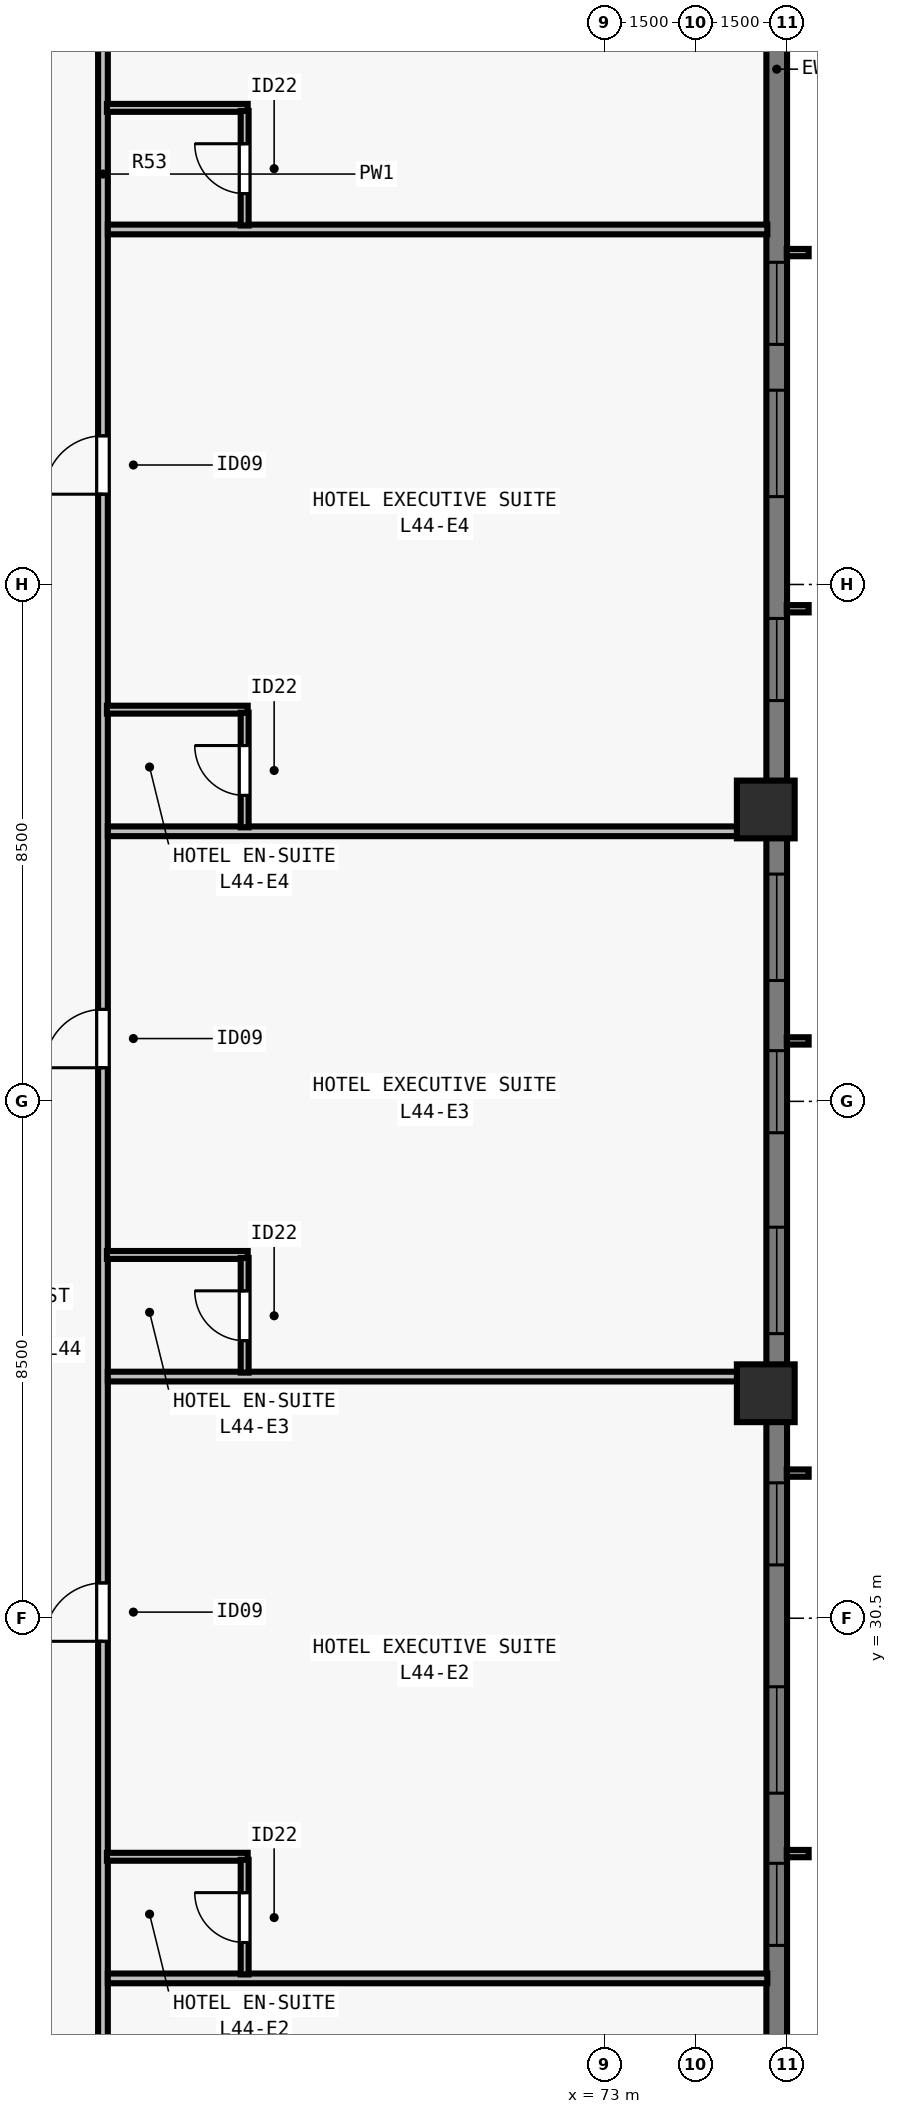
"""IFC4 building model, lengths in metres.
Left out: names, types, materials, properties, quantities, classifications, styles, units other than length and angle.
Written with IfcOpenShell. Run it as: python <this file> out.ifc"""

import sys

from ifc_helpers import new_model, si_unit, direction, frame, frame_2d, origin, origin_2d, place, context, subcontext, project, spatial, rectangle, extrude, element, fill, save


model = new_model("IFC4")
c1 = context("Model", 3, precision=1e-05, world=origin(), true_north=direction((0.0, 1.0)))
c2 = subcontext(c1, "Body", "Model", "MODEL_VIEW")
j1 = project(units=[si_unit("LENGTHUNIT", "METRE"), si_unit("PLANEANGLEUNIT", "RADIAN")], contexts=[c1])
p1 = place(None, origin())
s1 = spatial("IfcSite", under=j1, at=p1, CompositionType="ELEMENT")
p2 = place(p1, origin())
s2 = spatial("IfcBuilding", under=s1, at=p2, CompositionType="ELEMENT")
p3 = place(p2, frame((0.0, 0.0, 162.0)))
s3 = spatial("IfcBuildingStorey", under=s2, at=p3, CompositionType="ELEMENT", Elevation=162.0)
for number, where, z_axis, x_axis in (
    (1, (75.65, 34.2, 0.0), (0.0, 0.0, 1.0), (0.0, 1.0, 0.0)),
    (2, (75.65, 43.8, 0.0), (0.0, 0.0, 1.0), (0.0, 1.0, 0.0)),
):
    element("IfcColumn", number, at=place(p3, frame(where, z_axis=z_axis, x_axis=x_axis)), inside=s3, PredefinedType="COLUMN", context=c2, shape_type="SweptSolid", body=[
        extrude(rectangle(XDim=0.95, YDim=0.95, at=origin_2d()), origin(), (0.0, 0.0, 1.0), 3.5),
    ])
p4 = place(p3, frame((75.83, 59.0, 0.0), z_axis=(0.0, 0.0, 1.0), x_axis=(0.0, -1.0, 0.0)))
e3 = element("IfcWall", 3, at=p4, inside=s3, PredefinedType="SOLIDWALL", context=c2, shape_type="SweptSolid", body=[
    extrude(rectangle(XDim=39.682, YDim=0.34, at=frame_2d((19.841, 0.0))), origin(), (0.0, 0.0, 1.0), 3.28),
])
p5 = place(p4, frame((6.202, 0.0, 0.8)))
e4 = element("IfcOpeningElement", 4, at=p5, cuts=e3, PredefinedType="OPENING", context=c2, shape_type="SweptSolid", body=[
    extrude(rectangle(XDim=1.35, YDim=1.66, at=frame_2d((0.675, 0.83))), frame((0.0, 0.18, 0.0), z_axis=(0.0, -1.0, 0.0), x_axis=(1.0, 0.0, 0.0)), (0.0, 0.0, 1.0), 0.36),
])
p6 = place(p4, frame((8.305, 0.0, 0.8)))
e5 = element("IfcOpeningElement", 5, at=p6, cuts=e3, PredefinedType="OPENING", context=c2, shape_type="SweptSolid", body=[
    extrude(rectangle(XDim=1.75, YDim=1.66, at=frame_2d((0.875, 0.83))), frame((0.0, 0.18, 0.0), z_axis=(0.0, -1.0, 0.0), x_axis=(1.0, 0.0, 0.0)), (0.0, 0.0, 1.0), 0.36),
])
p7 = place(p4, frame((12.059, 0.0, 0.8)))
e6 = element("IfcOpeningElement", 6, at=p7, cuts=e3, PredefinedType="OPENING", context=c2, shape_type="SweptSolid", body=[
    extrude(rectangle(XDim=1.35, YDim=1.66, at=frame_2d((0.675, 0.83))), frame((0.0, 0.18, 0.0), z_axis=(0.0, -1.0, 0.0), x_axis=(1.0, 0.0, 0.0)), (0.0, 0.0, 1.0), 0.36),
])
p8 = place(p4, frame((16.262, 0.0, 0.8)))
e7 = element("IfcOpeningElement", 7, at=p8, cuts=e3, PredefinedType="OPENING", context=c2, shape_type="SweptSolid", body=[
    extrude(rectangle(XDim=1.75, YDim=1.66, at=frame_2d((0.875, 0.83))), frame((0.0, 0.18, 0.0), z_axis=(0.0, -1.0, 0.0), x_axis=(1.0, 0.0, 0.0)), (0.0, 0.0, 1.0), 0.36),
])
p9 = place(p4, frame((19.166, 0.0, 0.8)))
e8 = element("IfcOpeningElement", 8, at=p9, cuts=e3, PredefinedType="OPENING", context=c2, shape_type="SweptSolid", body=[
    extrude(rectangle(XDim=1.35, YDim=1.66, at=frame_2d((0.675, 0.83))), frame((0.0, 0.18, 0.0), z_axis=(0.0, -1.0, 0.0), x_axis=(1.0, 0.0, 0.0)), (0.0, 0.0, 1.0), 0.36),
])
p10 = place(p4, frame((22.07, 0.0, 0.8)))
e9 = element("IfcOpeningElement", 9, at=p10, cuts=e3, PredefinedType="OPENING", context=c2, shape_type="SweptSolid", body=[
    extrude(rectangle(XDim=1.75, YDim=1.66, at=frame_2d((0.875, 0.83))), frame((0.0, 0.18, 0.0), z_axis=(0.0, -1.0, 0.0), x_axis=(1.0, 0.0, 0.0)), (0.0, 0.0, 1.0), 0.36),
])
p11 = place(p4, frame((26.273, 0.0, 0.8)))
e10 = element("IfcOpeningElement", 10, at=p11, cuts=e3, PredefinedType="OPENING", context=c2, shape_type="SweptSolid", body=[
    extrude(rectangle(XDim=1.35, YDim=1.66, at=frame_2d((0.675, 0.83))), frame((0.0, 0.18, 0.0), z_axis=(0.0, -1.0, 0.0), x_axis=(1.0, 0.0, 0.0)), (0.0, 0.0, 1.0), 0.36),
])
p12 = place(p4, frame((29.627, 0.0, 0.8)))
e11 = element("IfcOpeningElement", 11, at=p12, cuts=e3, PredefinedType="OPENING", context=c2, shape_type="SweptSolid", body=[
    extrude(rectangle(XDim=1.75, YDim=1.66, at=frame_2d((0.875, 0.83))), frame((0.0, 0.18, 0.0), z_axis=(0.0, -1.0, 0.0), x_axis=(1.0, 0.0, 0.0)), (0.0, 0.0, 1.0), 0.36),
])
p13 = place(p4, frame((32.53, 0.0, 0.8)))
e12 = element("IfcOpeningElement", 12, at=p13, cuts=e3, PredefinedType="OPENING", context=c2, shape_type="SweptSolid", body=[
    extrude(rectangle(XDim=1.35, YDim=1.66, at=frame_2d((0.675, 0.83))), frame((0.0, 0.18, 0.0), z_axis=(0.0, -1.0, 0.0), x_axis=(1.0, 0.0, 0.0)), (0.0, 0.0, 1.0), 0.36),
])
p14 = place(p3, frame((64.75, 15.325, 0.0), z_axis=(0.0, 0.0, 1.0), x_axis=(0.0, 1.0, 0.0)))
e13 = element("IfcWall", 13, at=p14, inside=s3, PredefinedType="PARTITIONING", context=c2, shape_type="SweptSolid", body=[
    extrude(rectangle(XDim=47.35, YDim=0.16, at=frame_2d((23.675, 0.0))), origin(), (0.0, 0.0, 1.0), 2.555),
])
p15 = place(p14, frame((5.494, 0.0, 0.0)))
e14 = element("IfcOpeningElement", 14, at=p15, cuts=e13, PredefinedType="OPENING", context=c2, shape_type="SweptSolid", body=[
    extrude(rectangle(XDim=0.96, YDim=2.15, at=frame_2d((0.48, 1.075))), frame((0.0, 0.09, 0.0), z_axis=(0.0, -1.0, 0.0), x_axis=(1.0, 0.0, 0.0)), (0.0, 0.0, 1.0), 0.18),
])
p16 = place(p14, frame((14.796, 0.0, 0.0)))
e15 = element("IfcOpeningElement", 15, at=p16, cuts=e13, PredefinedType="OPENING", context=c2, shape_type="SweptSolid", body=[
    extrude(rectangle(XDim=0.96, YDim=2.15, at=frame_2d((0.48, 1.075))), frame((0.0, 0.09, 0.0), z_axis=(0.0, -1.0, 0.0), x_axis=(1.0, 0.0, 0.0)), (0.0, 0.0, 1.0), 0.18),
])
p17 = place(p14, frame((24.228, 0.0, 0.0)))
e16 = element("IfcOpeningElement", 16, at=p17, cuts=e13, PredefinedType="OPENING", context=c2, shape_type="SweptSolid", body=[
    extrude(rectangle(XDim=0.96, YDim=2.15, at=frame_2d((0.48, 1.075))), frame((0.0, 0.09, 0.0), z_axis=(0.0, -1.0, 0.0), x_axis=(1.0, 0.0, 0.0)), (0.0, 0.0, 1.0), 0.18),
])
p18 = place(p14, frame((33.66, 0.0, 0.0)))
e17 = element("IfcOpeningElement", 17, at=p18, cuts=e13, PredefinedType="OPENING", context=c2, shape_type="SweptSolid", body=[
    extrude(rectangle(XDim=0.96, YDim=2.15, at=frame_2d((0.48, 1.075))), frame((0.0, 0.09, 0.0), z_axis=(0.0, -1.0, 0.0), x_axis=(1.0, 0.0, 0.0)), (0.0, 0.0, 1.0), 0.18),
])
p19 = place(p14, frame((43.229, 0.0, 0.0)))
e18 = element("IfcOpeningElement", 18, at=p19, cuts=e13, PredefinedType="OPENING", context=c2, shape_type="SweptSolid", body=[
    extrude(rectangle(XDim=0.96, YDim=2.15, at=frame_2d((0.48, 1.075))), frame((0.0, 0.09, 0.0), z_axis=(0.0, -1.0, 0.0), x_axis=(1.0, 0.0, 0.0)), (0.0, 0.0, 1.0), 0.18),
])
p20 = place(p3, frame((64.83, 24.577, 0.0), z_axis=(0.0, 0.0, 1.0), x_axis=(1.0, 0.0, 0.0)))
e19 = element("IfcWall", 19, at=p20, inside=s3, PredefinedType="PARTITIONING", context=c2, shape_type="SweptSolid", body=[
    extrude(rectangle(XDim=10.845, YDim=0.16, at=frame_2d((5.422, 0.0))), origin(), (0.0, 0.0, 1.0), 2.896),
])
p21 = place(p3, frame((64.815, 26.577, 0.0), z_axis=(0.0, 0.0, 1.0), x_axis=(1.0, 0.0, 0.0)))
e20 = element("IfcWall", 20, at=p21, inside=s3, PredefinedType="PLUMBINGWALL", context=c2, shape_type="SweptSolid", body=[
    extrude(rectangle(XDim=2.315, YDim=0.13, at=frame_2d((1.157, 0.0))), origin(), (0.0, 0.0, 1.0), 2.896),
])
p22 = place(p3, frame((67.08, 24.642, 0.0), z_axis=(0.0, 0.0, 1.0), x_axis=(0.0, 1.0, 0.0)))
e21 = element("IfcWall", 21, at=p22, inside=s3, PredefinedType="PLUMBINGWALL", context=c2, shape_type="SweptSolid", body=[
    extrude(rectangle(XDim=1.885, YDim=0.13, at=frame_2d((0.942, 0.0))), origin(), (0.0, 0.0, 1.0), 3.28),
])
p23 = place(p22, frame((0.525, 0.0, 0.0)))
e22 = element("IfcOpeningElement", 22, at=p23, cuts=e21, PredefinedType="OPENING", context=c2, shape_type="SweptSolid", body=[
    extrude(rectangle(XDim=0.82, YDim=2.1, at=frame_2d((0.41, 1.05))), frame((0.0, 0.075, 0.0), z_axis=(0.0, -1.0, 0.0), x_axis=(1.0, 0.0, 0.0)), (0.0, 0.0, 1.0), 0.15),
])
p24 = place(p3, frame((64.83, 34.474, 0.0), z_axis=(0.0, 0.0, 1.0), x_axis=(1.0, 0.0, 0.0)))
e23 = element("IfcWall", 23, at=p24, inside=s3, PredefinedType="PARTITIONING", context=c2, shape_type="SweptSolid", body=[
    extrude(rectangle(XDim=10.845, YDim=0.16, at=frame_2d((5.422, 0.0))), origin(), (0.0, 0.0, 1.0), 3.28),
])
p25 = place(p3, frame((64.815, 36.474, 0.0), z_axis=(0.0, 0.0, 1.0), x_axis=(1.0, 0.0, 0.0)))
e24 = element("IfcWall", 24, at=p25, inside=s3, PredefinedType="PLUMBINGWALL", context=c2, shape_type="SweptSolid", body=[
    extrude(rectangle(XDim=2.315, YDim=0.13, at=frame_2d((1.157, 0.0))), origin(), (0.0, 0.0, 1.0), 3.28),
])
p26 = place(p3, frame((67.08, 34.539, 0.0), z_axis=(0.0, 0.0, 1.0), x_axis=(0.0, 1.0, 0.0)))
e25 = element("IfcWall", 25, at=p26, inside=s3, PredefinedType="PLUMBINGWALL", context=c2, shape_type="SweptSolid", body=[
    extrude(rectangle(XDim=1.885, YDim=0.13, at=frame_2d((0.942, 0.0))), origin(), (0.0, 0.0, 1.0), 3.28),
])
p27 = place(p26, frame((0.525, 0.0, 0.0)))
e26 = element("IfcOpeningElement", 26, at=p27, cuts=e25, PredefinedType="OPENING", context=c2, shape_type="SweptSolid", body=[
    extrude(rectangle(XDim=0.82, YDim=2.1, at=frame_2d((0.41, 1.05))), frame((0.0, 0.075, 0.0), z_axis=(0.0, -1.0, 0.0), x_axis=(1.0, 0.0, 0.0)), (0.0, 0.0, 1.0), 0.15),
])
p28 = place(p3, frame((64.83, 43.441, 0.0), z_axis=(0.0, 0.0, 1.0), x_axis=(1.0, 0.0, 0.0)))
e27 = element("IfcWall", 27, at=p28, inside=s3, PredefinedType="PARTITIONING", context=c2, shape_type="SweptSolid", body=[
    extrude(rectangle(XDim=10.845, YDim=0.16, at=frame_2d((5.422, 0.0))), origin(), (0.0, 0.0, 1.0), 3.28),
])
p29 = place(p3, frame((64.815, 45.441, 0.0), z_axis=(0.0, 0.0, 1.0), x_axis=(1.0, 0.0, 0.0)))
e28 = element("IfcWall", 28, at=p29, inside=s3, PredefinedType="PLUMBINGWALL", context=c2, shape_type="SweptSolid", body=[
    extrude(rectangle(XDim=2.315, YDim=0.13, at=frame_2d((1.157, 0.0))), origin(), (0.0, 0.0, 1.0), 3.28),
])
p30 = place(p3, frame((67.08, 43.506, 0.0), z_axis=(0.0, 0.0, 1.0), x_axis=(0.0, 1.0, 0.0)))
e29 = element("IfcWall", 29, at=p30, inside=s3, PredefinedType="PLUMBINGWALL", context=c2, shape_type="SweptSolid", body=[
    extrude(rectangle(XDim=1.885, YDim=0.13, at=frame_2d((0.942, 0.0))), origin(), (0.0, 0.0, 1.0), 3.28),
])
p31 = place(p30, frame((0.525, 0.0, 0.0)))
e30 = element("IfcOpeningElement", 30, at=p31, cuts=e29, PredefinedType="OPENING", context=c2, shape_type="SweptSolid", body=[
    extrude(rectangle(XDim=0.82, YDim=2.1, at=frame_2d((0.41, 1.05))), frame((0.0, 0.075, 0.0), z_axis=(0.0, -1.0, 0.0), x_axis=(1.0, 0.0, 0.0)), (0.0, 0.0, 1.0), 0.15),
])
p32 = place(p3, frame((64.83, 53.338, 0.0), z_axis=(0.0, 0.0, 1.0), x_axis=(1.0, 0.0, 0.0)))
e31 = element("IfcWall", 31, at=p32, inside=s3, PredefinedType="PARTITIONING", context=c2, shape_type="SweptSolid", body=[
    extrude(rectangle(XDim=10.845, YDim=0.16, at=frame_2d((5.422, 0.0))), origin(), (0.0, 0.0, 1.0), 2.896),
])
p33 = place(p3, frame((64.815, 55.338, 0.0), z_axis=(0.0, 0.0, 1.0), x_axis=(1.0, 0.0, 0.0)))
e32 = element("IfcWall", 32, at=p33, inside=s3, PredefinedType="PLUMBINGWALL", context=c2, shape_type="SweptSolid", body=[
    extrude(rectangle(XDim=2.315, YDim=0.13, at=frame_2d((1.157, 0.0))), origin(), (0.0, 0.0, 1.0), 3.28),
])
p34 = place(p3, frame((67.08, 53.403, 0.0), z_axis=(0.0, 0.0, 1.0), x_axis=(0.0, 1.0, 0.0)))
e33 = element("IfcWall", 33, at=p34, inside=s3, PredefinedType="PLUMBINGWALL", context=c2, shape_type="SweptSolid", body=[
    extrude(rectangle(XDim=1.885, YDim=0.13, at=frame_2d((0.942, 0.0))), origin(), (0.0, 0.0, 1.0), 3.28),
])
p35 = place(p34, frame((0.525, 0.0, 0.0)))
e34 = element("IfcOpeningElement", 34, at=p35, cuts=e33, PredefinedType="OPENING", context=c2, shape_type="SweptSolid", body=[
    extrude(rectangle(XDim=0.82, YDim=2.1, at=frame_2d((0.41, 1.05))), frame((0.0, 0.075, 0.0), z_axis=(0.0, -1.0, 0.0), x_axis=(1.0, 0.0, 0.0)), (0.0, 0.0, 1.0), 0.15),
])
p36 = place(p5, origin())
e35 = element("IfcWindow", 35, at=p36, inside=s3, PartitioningType="SINGLE_PANEL", PredefinedType="WINDOW", context=c2, shape_type="SweptSolid", body=[
    extrude(rectangle(XDim=1.35, YDim=1.66, at=frame_2d((0.675, 0.83))), frame((0.0, -0.05, 0.0), z_axis=(0.0, -1.0, 0.0), x_axis=(1.0, 0.0, 0.0)), (0.0, 0.0, 1.0), 0.06),
])
fill(e4, e35)
p37 = place(p6, origin())
e36 = element("IfcWindow", 36, at=p37, inside=s3, PartitioningType="SINGLE_PANEL", PredefinedType="WINDOW", context=c2, shape_type="SweptSolid", body=[
    extrude(rectangle(XDim=1.75, YDim=1.66, at=frame_2d((0.875, 0.83))), frame((0.0, -0.05, 0.0), z_axis=(0.0, -1.0, 0.0), x_axis=(1.0, 0.0, 0.0)), (0.0, 0.0, 1.0), 0.06),
])
fill(e5, e36)
p38 = place(p7, origin())
e37 = element("IfcWindow", 37, at=p38, inside=s3, PartitioningType="SINGLE_PANEL", PredefinedType="WINDOW", context=c2, shape_type="SweptSolid", body=[
    extrude(rectangle(XDim=1.35, YDim=1.66, at=frame_2d((0.675, 0.83))), frame((0.0, -0.05, 0.0), z_axis=(0.0, -1.0, 0.0), x_axis=(1.0, 0.0, 0.0)), (0.0, 0.0, 1.0), 0.06),
])
fill(e6, e37)
p39 = place(p8, origin())
e38 = element("IfcWindow", 38, at=p39, inside=s3, PartitioningType="SINGLE_PANEL", PredefinedType="WINDOW", context=c2, shape_type="SweptSolid", body=[
    extrude(rectangle(XDim=1.75, YDim=1.66, at=frame_2d((0.875, 0.83))), frame((0.0, -0.05, 0.0), z_axis=(0.0, -1.0, 0.0), x_axis=(1.0, 0.0, 0.0)), (0.0, 0.0, 1.0), 0.06),
])
fill(e7, e38)
p40 = place(p9, origin())
e39 = element("IfcWindow", 39, at=p40, inside=s3, PartitioningType="SINGLE_PANEL", PredefinedType="WINDOW", context=c2, shape_type="SweptSolid", body=[
    extrude(rectangle(XDim=1.35, YDim=1.66, at=frame_2d((0.675, 0.83))), frame((0.0, -0.05, 0.0), z_axis=(0.0, -1.0, 0.0), x_axis=(1.0, 0.0, 0.0)), (0.0, 0.0, 1.0), 0.06),
])
fill(e8, e39)
p41 = place(p10, origin())
e40 = element("IfcWindow", 40, at=p41, inside=s3, PartitioningType="SINGLE_PANEL", PredefinedType="WINDOW", context=c2, shape_type="SweptSolid", body=[
    extrude(rectangle(XDim=1.75, YDim=1.66, at=frame_2d((0.875, 0.83))), frame((0.0, -0.05, 0.0), z_axis=(0.0, -1.0, 0.0), x_axis=(1.0, 0.0, 0.0)), (0.0, 0.0, 1.0), 0.06),
])
fill(e9, e40)
p42 = place(p11, origin())
e41 = element("IfcWindow", 41, at=p42, inside=s3, PartitioningType="SINGLE_PANEL", PredefinedType="WINDOW", context=c2, shape_type="SweptSolid", body=[
    extrude(rectangle(XDim=1.35, YDim=1.66, at=frame_2d((0.675, 0.83))), frame((0.0, -0.05, 0.0), z_axis=(0.0, -1.0, 0.0), x_axis=(1.0, 0.0, 0.0)), (0.0, 0.0, 1.0), 0.06),
])
fill(e10, e41)
p43 = place(p12, origin())
e42 = element("IfcWindow", 42, at=p43, inside=s3, PartitioningType="SINGLE_PANEL", PredefinedType="WINDOW", context=c2, shape_type="SweptSolid", body=[
    extrude(rectangle(XDim=1.75, YDim=1.66, at=frame_2d((0.875, 0.83))), frame((0.0, -0.05, 0.0), z_axis=(0.0, -1.0, 0.0), x_axis=(1.0, 0.0, 0.0)), (0.0, 0.0, 1.0), 0.06),
])
fill(e11, e42)
p44 = place(p13, origin())
e43 = element("IfcWindow", 43, at=p44, inside=s3, PartitioningType="SINGLE_PANEL", PredefinedType="WINDOW", context=c2, shape_type="SweptSolid", body=[
    extrude(rectangle(XDim=1.35, YDim=1.66, at=frame_2d((0.675, 0.83))), frame((0.0, -0.05, 0.0), z_axis=(0.0, -1.0, 0.0), x_axis=(1.0, 0.0, 0.0)), (0.0, 0.0, 1.0), 0.06),
])
fill(e12, e43)
p45 = place(p23, origin())
e44 = element("IfcDoor", 44, at=p45, inside=s3, OperationType="SINGLE_SWING_RIGHT", PredefinedType="DOOR", context=c2, shape_type="SweptSolid", body=[
    extrude(rectangle(XDim=0.82, YDim=2.1, at=frame_2d((0.41, 1.05))), frame((0.0, 0.025, 0.0), z_axis=(0.0, -1.0, 0.0), x_axis=(1.0, 0.0, 0.0)), (0.0, 0.0, 1.0), 0.05),
])
fill(e22, e44)
p46 = place(p16, origin())
e45 = element("IfcDoor", 45, at=p46, inside=s3, OperationType="SINGLE_SWING_LEFT", PredefinedType="DOOR", context=c2, shape_type="SweptSolid", body=[
    extrude(rectangle(XDim=0.96, YDim=2.15, at=frame_2d((0.48, 1.075))), frame((0.0, 0.025, 0.0), z_axis=(0.0, -1.0, 0.0), x_axis=(1.0, 0.0, 0.0)), (0.0, 0.0, 1.0), 0.05),
])
fill(e15, e45)
p47 = place(p27, origin())
e46 = element("IfcDoor", 46, at=p47, inside=s3, OperationType="SINGLE_SWING_RIGHT", PredefinedType="DOOR", context=c2, shape_type="SweptSolid", body=[
    extrude(rectangle(XDim=0.82, YDim=2.1, at=frame_2d((0.41, 1.05))), frame((0.0, 0.025, 0.0), z_axis=(0.0, -1.0, 0.0), x_axis=(1.0, 0.0, 0.0)), (0.0, 0.0, 1.0), 0.05),
])
fill(e26, e46)
p48 = place(p17, origin())
e47 = element("IfcDoor", 47, at=p48, inside=s3, OperationType="SINGLE_SWING_LEFT", PredefinedType="DOOR", context=c2, shape_type="SweptSolid", body=[
    extrude(rectangle(XDim=0.96, YDim=2.15, at=frame_2d((0.48, 1.075))), frame((0.0, 0.025, 0.0), z_axis=(0.0, -1.0, 0.0), x_axis=(1.0, 0.0, 0.0)), (0.0, 0.0, 1.0), 0.05),
])
fill(e16, e47)
p49 = place(p31, origin())
e48 = element("IfcDoor", 48, at=p49, inside=s3, OperationType="SINGLE_SWING_RIGHT", PredefinedType="DOOR", context=c2, shape_type="SweptSolid", body=[
    extrude(rectangle(XDim=0.82, YDim=2.1, at=frame_2d((0.41, 1.05))), frame((0.0, 0.025, 0.0), z_axis=(0.0, -1.0, 0.0), x_axis=(1.0, 0.0, 0.0)), (0.0, 0.0, 1.0), 0.05),
])
fill(e30, e48)
p50 = place(p18, origin())
e49 = element("IfcDoor", 49, at=p50, inside=s3, OperationType="SINGLE_SWING_LEFT", PredefinedType="DOOR", context=c2, shape_type="SweptSolid", body=[
    extrude(rectangle(XDim=0.96, YDim=2.15, at=frame_2d((0.48, 1.075))), frame((0.0, 0.025, 0.0), z_axis=(0.0, -1.0, 0.0), x_axis=(1.0, 0.0, 0.0)), (0.0, 0.0, 1.0), 0.05),
])
fill(e17, e49)
p51 = place(p35, origin())
e50 = element("IfcDoor", 50, at=p51, inside=s3, OperationType="SINGLE_SWING_RIGHT", PredefinedType="DOOR", context=c2, shape_type="SweptSolid", body=[
    extrude(rectangle(XDim=0.82, YDim=2.1, at=frame_2d((0.41, 1.05))), frame((0.0, 0.025, 0.0), z_axis=(0.0, -1.0, 0.0), x_axis=(1.0, 0.0, 0.0)), (0.0, 0.0, 1.0), 0.05),
])
fill(e34, e50)
save(model, sys.argv[1])
